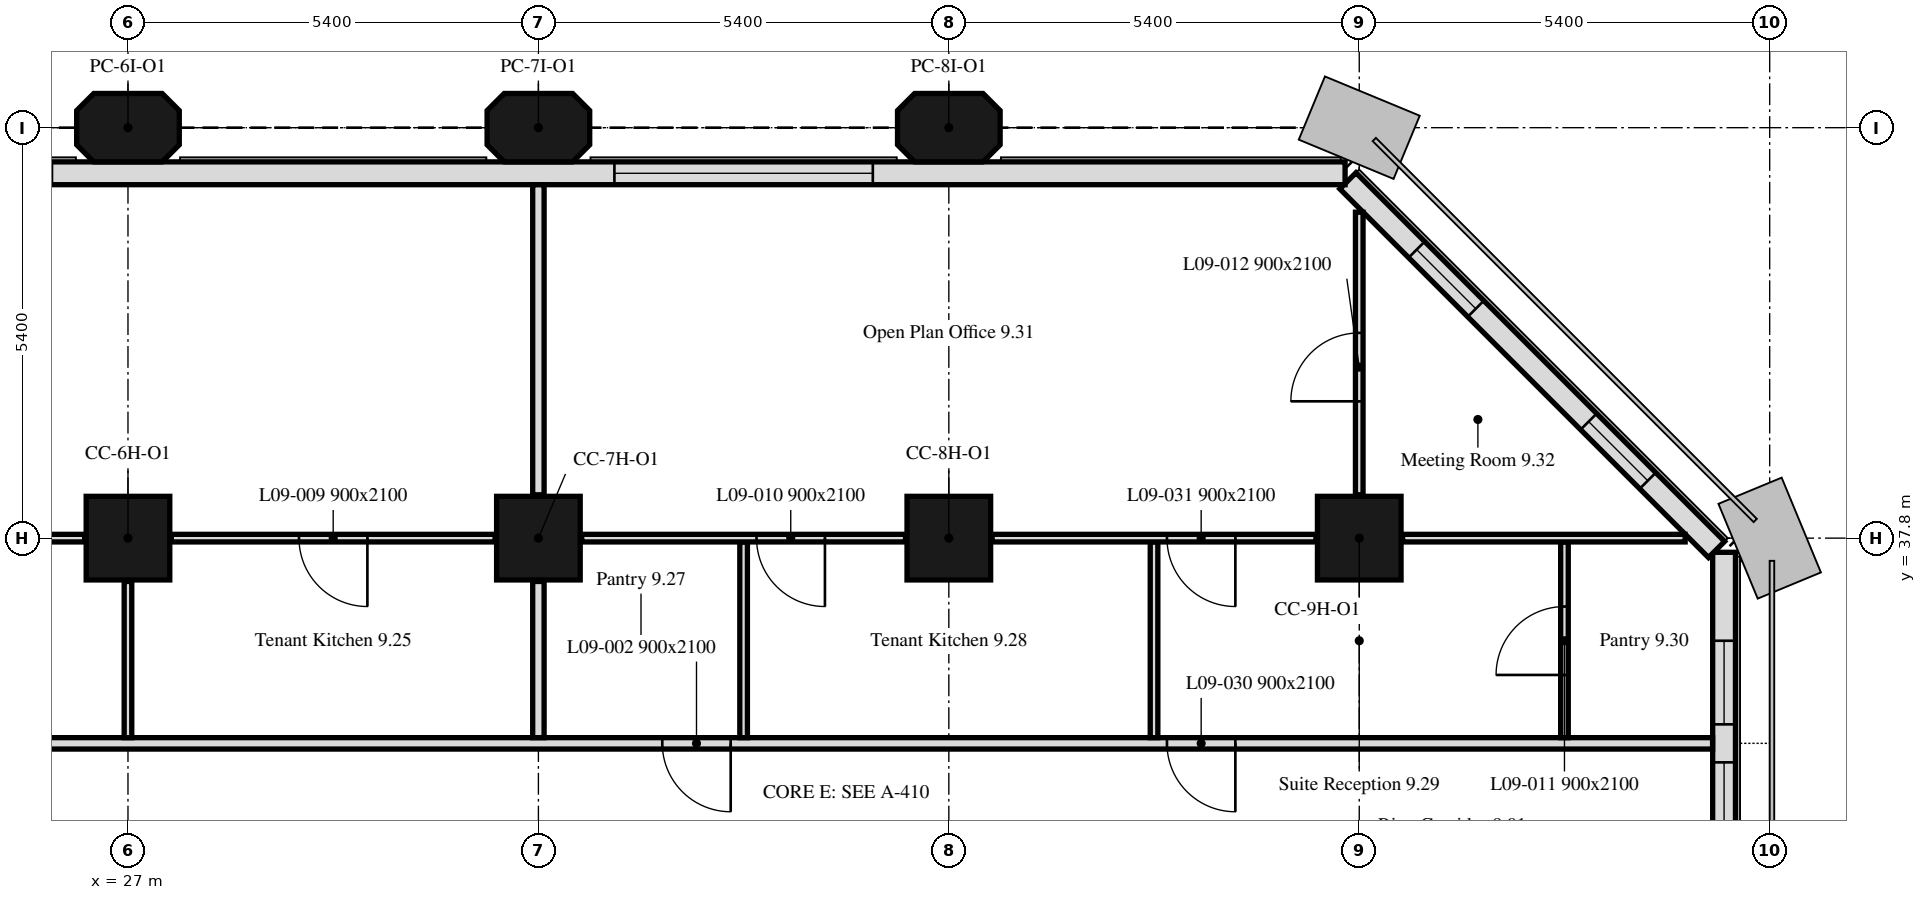
"""IFC4 building model, lengths in metres.
Left out: names, types, materials, properties, quantities, classifications, styles, units other than length and angle.
Written with IfcOpenShell. Run it as: python <this file> out.ifc"""

import sys

from ifc_helpers import new_model, si_unit, direction, frame, frame_2d, origin, origin_2d, place, context, subcontext, project, spatial, polyline, rectangle, outline, extrude, element, fill, save


model = new_model("IFC4")
c1 = context("Model", 3, precision=1e-05, world=origin(), true_north=direction((0.0, 1.0)))
c2 = subcontext(c1, "Body", "Model", "MODEL_VIEW")
j1 = project(units=[si_unit("LENGTHUNIT", "METRE"), si_unit("PLANEANGLEUNIT", "RADIAN")], contexts=[c1])
p1 = place(None, origin())
s1 = spatial("IfcSite", under=j1, at=p1, CompositionType="ELEMENT")
p2 = place(p1, origin())
s2 = spatial("IfcBuilding", under=s1, at=p2, CompositionType="ELEMENT")
p3 = place(p2, frame((0.0, 0.0, 45.0)))
s3 = spatial("IfcBuildingStorey", under=s2, at=p3, CompositionType="ELEMENT", Elevation=45.0)
for number, where, z_axis, x_axis in (
    (1, (27.0, 37.8, 0.0), (0.0, 0.0, 1.0), (1.0, 0.0, 0.0)),
    (2, (32.4, 37.8, 0.0), (0.0, 0.0, 1.0), (1.0, 0.0, 0.0)),
    (3, (37.8, 37.8, 0.0), (0.0, 0.0, 1.0), (1.0, 0.0, 0.0)),
    (4, (43.2, 37.8, 0.0), (0.0, 0.0, 1.0), (1.0, 0.0, 0.0)),
):
    element("IfcColumn", number, at=place(p3, frame(where, z_axis=z_axis, x_axis=x_axis)), inside=s3, PredefinedType="COLUMN", context=c2, shape_type="SweptSolid", body=[
        extrude(rectangle(XDim=1.1, YDim=1.1, at=origin_2d()), origin(), (0.0, 0.0, 1.0), 3.5),
    ])
for number, where, z_axis, x_axis in (
    (5, (27.0, 43.2, 0.0), (0.0, 0.0, 1.0), (1.0, 0.0, 0.0)),
    (6, (32.4, 43.2, 0.0), (0.0, 0.0, 1.0), (1.0, 0.0, 0.0)),
    (7, (37.8, 43.2, 0.0), (0.0, 0.0, 1.0), (1.0, 0.0, 0.0)),
):
    element("IfcColumn", number, at=place(p3, frame(where, z_axis=z_axis, x_axis=x_axis)), inside=s3, PredefinedType="COLUMN", context=c2, shape_type="SweptSolid", body=[
        extrude(outline(polyline([(-0.45, -0.45), (0.45, -0.45), (0.675, -0.225), (0.675, 0.225), (0.45, 0.45), (-0.45, 0.45), (-0.675, 0.225), (-0.675, -0.225), (-0.45, -0.45)])), origin(), (0.0, 0.0, 1.0), 3.5),
    ])
p4 = place(p3, frame((48.0, 5.586, 0.0), z_axis=(0.0, 0.0, 1.0), x_axis=(0.0, 1.0, 0.0)))
e8 = element("IfcWall", 8, at=p4, inside=s3, PredefinedType="SOLIDWALL", context=c2, shape_type="SweptSolid", body=[
    extrude(rectangle(XDim=32.027, YDim=0.3, at=frame_2d((16.014, 0.0))), origin(), (0.0, 0.0, 1.0), 3.5),
])
p5 = place(p4, frame((6.564, 0.0, 0.9)))
e9 = element("IfcOpeningElement", 9, at=p5, cuts=e8, PredefinedType="OPENING", context=c2, shape_type="SweptSolid", body=[
    extrude(rectangle(XDim=1.1, YDim=1.7, at=frame_2d((0.55, 0.85))), frame((0.0, 0.16, 0.0), z_axis=(0.0, -1.0, 0.0), x_axis=(1.0, 0.0, 0.0)), (0.0, 0.0, 1.0), 0.32),
])
p6 = place(p4, frame((8.164, 0.0, 0.9)))
e10 = element("IfcOpeningElement", 10, at=p6, cuts=e8, PredefinedType="OPENING", context=c2, shape_type="SweptSolid", body=[
    extrude(rectangle(XDim=1.1, YDim=1.7, at=frame_2d((0.55, 0.85))), frame((0.0, 0.16, 0.0), z_axis=(0.0, -1.0, 0.0), x_axis=(1.0, 0.0, 0.0)), (0.0, 0.0, 1.0), 0.32),
])
p7 = place(p4, frame((17.014, 0.0, 0.9)))
e11 = element("IfcOpeningElement", 11, at=p7, cuts=e8, PredefinedType="OPENING", context=c2, shape_type="SweptSolid", body=[
    extrude(rectangle(XDim=3.4, YDim=1.7, at=frame_2d((1.7, 0.85))), frame((0.0, 0.16, 0.0), z_axis=(0.0, -1.0, 0.0), x_axis=(1.0, 0.0, 0.0)), (0.0, 0.0, 1.0), 0.32),
])
p8 = place(p4, frame((28.164, 0.0, 0.9)))
e12 = element("IfcOpeningElement", 12, at=p8, cuts=e8, PredefinedType="OPENING", context=c2, shape_type="SweptSolid", body=[
    extrude(rectangle(XDim=1.1, YDim=1.7, at=frame_2d((0.55, 0.85))), frame((0.0, 0.16, 0.0), z_axis=(0.0, -1.0, 0.0), x_axis=(1.0, 0.0, 0.0)), (0.0, 0.0, 1.0), 0.32),
])
p9 = place(p4, frame((29.764, 0.0, 0.9)))
e13 = element("IfcOpeningElement", 13, at=p9, cuts=e8, PredefinedType="OPENING", context=c2, shape_type="SweptSolid", body=[
    extrude(rectangle(XDim=1.1, YDim=1.7, at=frame_2d((0.55, 0.85))), frame((0.0, 0.16, 0.0), z_axis=(0.0, -1.0, 0.0), x_axis=(1.0, 0.0, 0.0)), (0.0, 0.0, 1.0), 0.32),
])
p10 = place(p3, frame((47.901, 37.65, 0.0), z_axis=(0.0, 0.0, 1.0), x_axis=(-0.707106781187, 0.707106781187, 0.0)))
e14 = element("IfcWall", 14, at=p10, inside=s3, PredefinedType="SOLIDWALL", context=c2, shape_type="SweptSolid", body=[
    extrude(rectangle(XDim=6.86, YDim=0.3, at=frame_2d((3.43, 0.0))), origin(), (0.0, 0.0, 1.0), 3.5),
])
p11 = place(p10, frame((1.28, 0.0, 0.9)))
e15 = element("IfcOpeningElement", 15, at=p11, cuts=e14, PredefinedType="OPENING", context=c2, shape_type="SweptSolid", body=[
    extrude(rectangle(XDim=1.1, YDim=1.7, at=frame_2d((0.55, 0.85))), frame((0.0, 0.16, 0.0), z_axis=(0.0, -1.0, 0.0), x_axis=(1.0, 0.0, 0.0)), (0.0, 0.0, 1.0), 0.32),
])
p12 = place(p10, frame((4.48, 0.0, 0.9)))
e16 = element("IfcOpeningElement", 16, at=p12, cuts=e14, PredefinedType="OPENING", context=c2, shape_type="SweptSolid", body=[
    extrude(rectangle(XDim=1.1, YDim=1.7, at=frame_2d((0.55, 0.85))), frame((0.0, 0.16, 0.0), z_axis=(0.0, -1.0, 0.0), x_axis=(1.0, 0.0, 0.0)), (0.0, 0.0, 1.0), 0.32),
])
p13 = place(p3, frame((43.014, 42.6, 0.0), z_axis=(0.0, 0.0, 1.0), x_axis=(-1.0, 0.0, 0.0)))
e17 = element("IfcWall", 17, at=p13, inside=s3, PredefinedType="SOLIDWALL", context=c2, shape_type="SweptSolid", body=[
    extrude(rectangle(XDim=32.027, YDim=0.3, at=frame_2d((16.014, 0.0))), origin(), (0.0, 0.0, 1.0), 3.5),
])
p14 = place(p13, frame((6.214, 0.0, 0.9)))
e18 = element("IfcOpeningElement", 18, at=p14, cuts=e17, PredefinedType="OPENING", context=c2, shape_type="SweptSolid", body=[
    extrude(rectangle(XDim=3.4, YDim=1.7, at=frame_2d((1.7, 0.85))), frame((0.0, 0.16, 0.0), z_axis=(0.0, -1.0, 0.0), x_axis=(1.0, 0.0, 0.0)), (0.0, 0.0, 1.0), 0.32),
])
p15 = place(p13, frame((17.014, 0.0, 0.9)))
e19 = element("IfcOpeningElement", 19, at=p15, cuts=e17, PredefinedType="OPENING", context=c2, shape_type="SweptSolid", body=[
    extrude(rectangle(XDim=3.4, YDim=1.7, at=frame_2d((1.7, 0.85))), frame((0.0, 0.16, 0.0), z_axis=(0.0, -1.0, 0.0), x_axis=(1.0, 0.0, 0.0)), (0.0, 0.0, 1.0), 0.32),
])
p16 = place(p13, frame((27.814, 0.0, 0.9)))
e20 = element("IfcOpeningElement", 20, at=p16, cuts=e17, PredefinedType="OPENING", context=c2, shape_type="SweptSolid", body=[
    extrude(rectangle(XDim=3.4, YDim=1.7, at=frame_2d((1.7, 0.85))), frame((0.0, 0.16, 0.0), z_axis=(0.0, -1.0, 0.0), x_axis=(1.0, 0.0, 0.0)), (0.0, 0.0, 1.0), 0.32),
])
p17 = place(p3, frame((47.849, 35.1, 0.0), z_axis=(0.0, 0.0, 1.0), x_axis=(-1.0, 0.0, 0.0)))
e21 = element("IfcWall", 21, at=p17, inside=s3, PredefinedType="PARTITIONING", context=c2, shape_type="SweptSolid", body=[
    extrude(rectangle(XDim=41.698, YDim=0.15, at=frame_2d((20.849, 0.0))), origin(), (0.0, 0.0, 1.0), 3.5),
])
p18 = place(p17, frame((39.919, 0.0, 0.0)))
e22 = element("IfcOpeningElement", 22, at=p18, cuts=e21, PredefinedType="OPENING", context=c2, shape_type="SweptSolid", body=[
    extrude(rectangle(XDim=0.9, YDim=2.1, at=frame_2d((0.45, 1.05))), frame((0.0, 0.075, 0.0), z_axis=(0.0, -1.0, 0.0), x_axis=(1.0, 0.0, 0.0)), (0.0, 0.0, 1.0), 0.15),
])
p19 = place(p17, frame((12.919, 0.0, 0.0)))
e23 = element("IfcOpeningElement", 23, at=p19, cuts=e21, PredefinedType="OPENING", context=c2, shape_type="SweptSolid", body=[
    extrude(rectangle(XDim=0.9, YDim=2.1, at=frame_2d((0.45, 1.05))), frame((0.0, 0.075, 0.0), z_axis=(0.0, -1.0, 0.0), x_axis=(1.0, 0.0, 0.0)), (0.0, 0.0, 1.0), 0.15),
])
p20 = place(p17, frame((28.499, 0.0, 0.0)))
e24 = element("IfcOpeningElement", 24, at=p20, cuts=e21, PredefinedType="OPENING", context=c2, shape_type="SweptSolid", body=[
    extrude(rectangle(XDim=0.9, YDim=2.1, at=frame_2d((0.45, 1.05))), frame((0.0, 0.075, 0.0), z_axis=(0.0, -1.0, 0.0), x_axis=(1.0, 0.0, 0.0)), (0.0, 0.0, 1.0), 0.15),
])
p21 = place(p17, frame((34.519, 0.0, 0.0)))
e25 = element("IfcOpeningElement", 25, at=p21, cuts=e21, PredefinedType="OPENING", context=c2, shape_type="SweptSolid", body=[
    extrude(rectangle(XDim=0.9, YDim=2.1, at=frame_2d((0.45, 1.05))), frame((0.0, 0.075, 0.0), z_axis=(0.0, -1.0, 0.0), x_axis=(1.0, 0.0, 0.0)), (0.0, 0.0, 1.0), 0.15),
])
p22 = place(p17, frame((6.279, 0.0, 0.0)))
e26 = element("IfcOpeningElement", 26, at=p22, cuts=e21, PredefinedType="OPENING", context=c2, shape_type="SweptSolid", body=[
    extrude(rectangle(XDim=0.9, YDim=2.1, at=frame_2d((0.45, 1.05))), frame((0.0, 0.075, 0.0), z_axis=(0.0, -1.0, 0.0), x_axis=(1.0, 0.0, 0.0)), (0.0, 0.0, 1.0), 0.15),
])
p23 = place(p3, frame((27.0, 35.175, 0.0), z_axis=(0.0, 0.0, 1.0), x_axis=(0.0, 1.0, 0.0)))
e27 = element("IfcWall", 27, at=p23, inside=s3, PredefinedType="PARTITIONING", context=c2, shape_type="SweptSolid", body=[
    extrude(rectangle(XDim=2.055, YDim=0.1, at=frame_2d((1.027, 0.0))), origin(), (0.0, 0.0, 1.0), 3.5),
])
p24 = place(p3, frame((26.43, 37.8, 0.0), z_axis=(0.0, 0.0, 1.0), x_axis=(-1.0, 0.0, 0.0)))
e28 = element("IfcWall", 28, at=p24, inside=s3, PredefinedType="PARTITIONING", context=c2, shape_type="SweptSolid", body=[
    extrude(rectangle(XDim=4.26, YDim=0.1, at=frame_2d((2.13, 0.0))), origin(), (0.0, 0.0, 1.0), 3.5),
])
p25 = place(p24, frame((1.68, 0.0, 0.0)))
e29 = element("IfcOpeningElement", 29, at=p25, cuts=e28, PredefinedType="OPENING", context=c2, shape_type="SweptSolid", body=[
    extrude(rectangle(XDim=0.9, YDim=2.1, at=frame_2d((0.45, 1.05))), frame((0.0, 0.05, 0.0), z_axis=(0.0, -1.0, 0.0), x_axis=(1.0, 0.0, 0.0)), (0.0, 0.0, 1.0), 0.1),
])
p26 = place(p3, frame((32.4, 35.175, 0.0), z_axis=(0.0, 0.0, 1.0), x_axis=(0.0, 1.0, 0.0)))
e30 = element("IfcWall", 30, at=p26, inside=s3, PredefinedType="PARTITIONING", context=c2, shape_type="SweptSolid", body=[
    extrude(rectangle(XDim=2.055, YDim=0.15, at=frame_2d((1.027, 0.0))), origin(), (0.0, 0.0, 1.0), 3.5),
])
p27 = place(p3, frame((31.83, 37.8, 0.0), z_axis=(0.0, 0.0, 1.0), x_axis=(-1.0, 0.0, 0.0)))
e31 = element("IfcWall", 31, at=p27, inside=s3, PredefinedType="PARTITIONING", context=c2, shape_type="SweptSolid", body=[
    extrude(rectangle(XDim=4.26, YDim=0.1, at=frame_2d((2.13, 0.0))), origin(), (0.0, 0.0, 1.0), 3.5),
])
p28 = place(p27, frame((1.68, 0.0, 0.0)))
e32 = element("IfcOpeningElement", 32, at=p28, cuts=e31, PredefinedType="OPENING", context=c2, shape_type="SweptSolid", body=[
    extrude(rectangle(XDim=0.9, YDim=2.1, at=frame_2d((0.45, 1.05))), frame((0.0, 0.05, 0.0), z_axis=(0.0, -1.0, 0.0), x_axis=(1.0, 0.0, 0.0)), (0.0, 0.0, 1.0), 0.1),
])
p29 = place(p3, frame((32.4, 38.37, 0.0), z_axis=(0.0, 0.0, 1.0), x_axis=(0.0, 1.0, 0.0)))
e33 = element("IfcWall", 33, at=p29, inside=s3, PredefinedType="PARTITIONING", context=c2, shape_type="SweptSolid", body=[
    extrude(rectangle(XDim=4.079, YDim=0.15, at=frame_2d((2.04, 0.0))), origin(), (0.0, 0.0, 1.0), 3.5),
])
for number, where, z_axis, x_axis in (
    (34, (35.1, 35.175, 0.0), (0.0, 0.0, 1.0), (0.0, 1.0, 0.0)),
    (35, (40.5, 35.175, 0.0), (0.0, 0.0, 1.0), (0.0, 1.0, 0.0)),
):
    element("IfcWall", number, at=place(p3, frame(where, z_axis=z_axis, x_axis=x_axis)), inside=s3, PredefinedType="PARTITIONING", context=c2, shape_type="SweptSolid", body=[
        extrude(rectangle(XDim=2.575, YDim=0.1, at=frame_2d((1.288, 0.0))), origin(), (0.0, 0.0, 1.0), 3.5),
    ])
p30 = place(p3, frame((37.23, 37.8, 0.0), z_axis=(0.0, 0.0, 1.0), x_axis=(-1.0, 0.0, 0.0)))
e36 = element("IfcWall", 36, at=p30, inside=s3, PredefinedType="PARTITIONING", context=c2, shape_type="SweptSolid", body=[
    extrude(rectangle(XDim=4.26, YDim=0.1, at=frame_2d((2.13, 0.0))), origin(), (0.0, 0.0, 1.0), 3.5),
])
p31 = place(p30, frame((1.06, 0.0, 0.0)))
e37 = element("IfcOpeningElement", 37, at=p31, cuts=e36, PredefinedType="OPENING", context=c2, shape_type="SweptSolid", body=[
    extrude(rectangle(XDim=0.9, YDim=2.1, at=frame_2d((0.45, 1.05))), frame((0.0, 0.05, 0.0), z_axis=(0.0, -1.0, 0.0), x_axis=(1.0, 0.0, 0.0)), (0.0, 0.0, 1.0), 0.1),
])
p32 = place(p3, frame((45.9, 35.175, 0.0), z_axis=(0.0, 0.0, 1.0), x_axis=(0.0, 1.0, 0.0)))
e38 = element("IfcWall", 38, at=p32, inside=s3, PredefinedType="PARTITIONING", context=c2, shape_type="SweptSolid", body=[
    extrude(rectangle(XDim=2.575, YDim=0.1, at=frame_2d((1.288, 0.0))), origin(), (0.0, 0.0, 1.0), 3.5),
])
p33 = place(p32, frame((0.825, 0.0, 0.0)))
e39 = element("IfcOpeningElement", 39, at=p33, cuts=e38, PredefinedType="OPENING", context=c2, shape_type="SweptSolid", body=[
    extrude(rectangle(XDim=0.9, YDim=2.1, at=frame_2d((0.45, 1.05))), frame((0.0, 0.05, 0.0), z_axis=(0.0, -1.0, 0.0), x_axis=(1.0, 0.0, 0.0)), (0.0, 0.0, 1.0), 0.1),
])
p34 = place(p3, frame((42.63, 37.8, 0.0), z_axis=(0.0, 0.0, 1.0), x_axis=(-1.0, 0.0, 0.0)))
e40 = element("IfcWall", 40, at=p34, inside=s3, PredefinedType="PARTITIONING", context=c2, shape_type="SweptSolid", body=[
    extrude(rectangle(XDim=4.26, YDim=0.1, at=frame_2d((2.13, 0.0))), origin(), (0.0, 0.0, 1.0), 3.5),
])
p35 = place(p34, frame((1.06, 0.0, 0.0)))
e41 = element("IfcOpeningElement", 41, at=p35, cuts=e40, PredefinedType="OPENING", context=c2, shape_type="SweptSolid", body=[
    extrude(rectangle(XDim=0.9, YDim=2.1, at=frame_2d((0.45, 1.05))), frame((0.0, 0.05, 0.0), z_axis=(0.0, -1.0, 0.0), x_axis=(1.0, 0.0, 0.0)), (0.0, 0.0, 1.0), 0.1),
])
p36 = place(p3, frame((47.488, 37.8, 0.0), z_axis=(0.0, 0.0, 1.0), x_axis=(-1.0, 0.0, 0.0)))
e42 = element("IfcWall", 42, at=p36, inside=s3, PredefinedType="PARTITIONING", context=c2, shape_type="SweptSolid", body=[
    extrude(rectangle(XDim=3.718, YDim=0.1, at=frame_2d((1.859, 0.0))), origin(), (0.0, 0.0, 1.0), 3.5),
])
p37 = place(p3, frame((43.2, 38.37, 0.0), z_axis=(0.0, 0.0, 1.0), x_axis=(0.0, 1.0, 0.0)))
e43 = element("IfcWall", 43, at=p37, inside=s3, PredefinedType="PARTITIONING", context=c2, shape_type="SweptSolid", body=[
    extrude(rectangle(XDim=3.718, YDim=0.1, at=frame_2d((1.859, 0.0))), origin(), (0.0, 0.0, 1.0), 3.5),
])
p38 = place(p37, frame((1.23, 0.0, 0.0)))
e44 = element("IfcOpeningElement", 44, at=p38, cuts=e43, PredefinedType="OPENING", context=c2, shape_type="SweptSolid", body=[
    extrude(rectangle(XDim=0.9, YDim=2.1, at=frame_2d((0.45, 1.05))), frame((0.0, 0.05, 0.0), z_axis=(0.0, -1.0, 0.0), x_axis=(1.0, 0.0, 0.0)), (0.0, 0.0, 1.0), 0.1),
])
p39 = place(p8, origin())
e45 = element("IfcWindow", 45, at=p39, inside=s3, PartitioningType="SINGLE_PANEL", PredefinedType="WINDOW", context=c2, shape_type="SweptSolid", body=[
    extrude(rectangle(XDim=1.1, YDim=1.7, at=frame_2d((0.55, 0.85))), frame((0.0, 0.03, 0.0), z_axis=(0.0, -1.0, 0.0), x_axis=(1.0, 0.0, 0.0)), (0.0, 0.0, 1.0), 0.06),
])
fill(e12, e45)
p40 = place(p9, origin())
e46 = element("IfcWindow", 46, at=p40, inside=s3, PartitioningType="SINGLE_PANEL", PredefinedType="WINDOW", context=c2, shape_type="SweptSolid", body=[
    extrude(rectangle(XDim=1.1, YDim=1.7, at=frame_2d((0.55, 0.85))), frame((0.0, 0.03, 0.0), z_axis=(0.0, -1.0, 0.0), x_axis=(1.0, 0.0, 0.0)), (0.0, 0.0, 1.0), 0.06),
])
fill(e13, e46)
p41 = place(p11, origin())
e47 = element("IfcWindow", 47, at=p41, inside=s3, PartitioningType="SINGLE_PANEL", PredefinedType="WINDOW", context=c2, shape_type="SweptSolid", body=[
    extrude(rectangle(XDim=1.1, YDim=1.7, at=frame_2d((0.55, 0.85))), frame((0.0, 0.03, 0.0), z_axis=(0.0, -1.0, 0.0), x_axis=(1.0, 0.0, 0.0)), (0.0, 0.0, 1.0), 0.06),
])
fill(e15, e47)
p42 = place(p12, origin())
e48 = element("IfcWindow", 48, at=p42, inside=s3, PartitioningType="SINGLE_PANEL", PredefinedType="WINDOW", context=c2, shape_type="SweptSolid", body=[
    extrude(rectangle(XDim=1.1, YDim=1.7, at=frame_2d((0.55, 0.85))), frame((0.0, 0.03, 0.0), z_axis=(0.0, -1.0, 0.0), x_axis=(1.0, 0.0, 0.0)), (0.0, 0.0, 1.0), 0.06),
])
fill(e16, e48)
p43 = place(p14, origin())
e49 = element("IfcWindow", 49, at=p43, inside=s3, PartitioningType="SINGLE_PANEL", PredefinedType="WINDOW", context=c2, shape_type="SweptSolid", body=[
    extrude(rectangle(XDim=3.4, YDim=1.7, at=frame_2d((1.7, 0.85))), frame((0.0, 0.03, 0.0), z_axis=(0.0, -1.0, 0.0), x_axis=(1.0, 0.0, 0.0)), (0.0, 0.0, 1.0), 0.06),
])
fill(e18, e49)
p44 = place(p19, origin())
e50 = element("IfcDoor", 50, at=p44, inside=s3, OperationType="SINGLE_SWING_RIGHT", PredefinedType="DOOR", context=c2, shape_type="SweptSolid", body=[
    extrude(rectangle(XDim=0.9, YDim=2.1, at=frame_2d((0.45, 1.05))), frame((0.0, 0.025, 0.0), z_axis=(0.0, -1.0, 0.0), x_axis=(1.0, 0.0, 0.0)), (0.0, 0.0, 1.0), 0.05),
])
fill(e23, e50)
p45 = place(p28, origin())
e51 = element("IfcDoor", 51, at=p45, inside=s3, OperationType="SINGLE_SWING_LEFT", PredefinedType="DOOR", context=c2, shape_type="SweptSolid", body=[
    extrude(rectangle(XDim=0.9, YDim=2.1, at=frame_2d((0.45, 1.05))), frame((0.0, 0.025, 0.0), z_axis=(0.0, -1.0, 0.0), x_axis=(1.0, 0.0, 0.0)), (0.0, 0.0, 1.0), 0.05),
])
fill(e32, e51)
p46 = place(p31, origin())
e52 = element("IfcDoor", 52, at=p46, inside=s3, OperationType="SINGLE_SWING_RIGHT", PredefinedType="DOOR", context=c2, shape_type="SweptSolid", body=[
    extrude(rectangle(XDim=0.9, YDim=2.1, at=frame_2d((0.45, 1.05))), frame((0.0, 0.025, 0.0), z_axis=(0.0, -1.0, 0.0), x_axis=(1.0, 0.0, 0.0)), (0.0, 0.0, 1.0), 0.05),
])
fill(e37, e52)
p47 = place(p33, origin())
e53 = element("IfcDoor", 53, at=p47, inside=s3, OperationType="SINGLE_SWING_LEFT", PredefinedType="DOOR", context=c2, shape_type="SweptSolid", body=[
    extrude(rectangle(XDim=0.9, YDim=2.1, at=frame_2d((0.45, 1.05))), frame((0.0, 0.025, 0.0), z_axis=(0.0, -1.0, 0.0), x_axis=(1.0, 0.0, 0.0)), (0.0, 0.0, 1.0), 0.05),
])
fill(e39, e53)
p48 = place(p38, origin())
e54 = element("IfcDoor", 54, at=p48, inside=s3, OperationType="SINGLE_SWING_LEFT", PredefinedType="DOOR", context=c2, shape_type="SweptSolid", body=[
    extrude(rectangle(XDim=0.9, YDim=2.1, at=frame_2d((0.45, 1.05))), frame((0.0, 0.025, 0.0), z_axis=(0.0, -1.0, 0.0), x_axis=(1.0, 0.0, 0.0)), (0.0, 0.0, 1.0), 0.05),
])
fill(e44, e54)
p49 = place(p22, origin())
e55 = element("IfcDoor", 55, at=p49, inside=s3, OperationType="SINGLE_SWING_RIGHT", PredefinedType="DOOR", context=c2, shape_type="SweptSolid", body=[
    extrude(rectangle(XDim=0.9, YDim=2.1, at=frame_2d((0.45, 1.05))), frame((0.0, 0.025, 0.0), z_axis=(0.0, -1.0, 0.0), x_axis=(1.0, 0.0, 0.0)), (0.0, 0.0, 1.0), 0.05),
])
fill(e26, e55)
p50 = place(p35, origin())
e56 = element("IfcDoor", 56, at=p50, inside=s3, OperationType="SINGLE_SWING_RIGHT", PredefinedType="DOOR", context=c2, shape_type="SweptSolid", body=[
    extrude(rectangle(XDim=0.9, YDim=2.1, at=frame_2d((0.45, 1.05))), frame((0.0, 0.025, 0.0), z_axis=(0.0, -1.0, 0.0), x_axis=(1.0, 0.0, 0.0)), (0.0, 0.0, 1.0), 0.05),
])
fill(e41, e56)
save(model, sys.argv[1])
